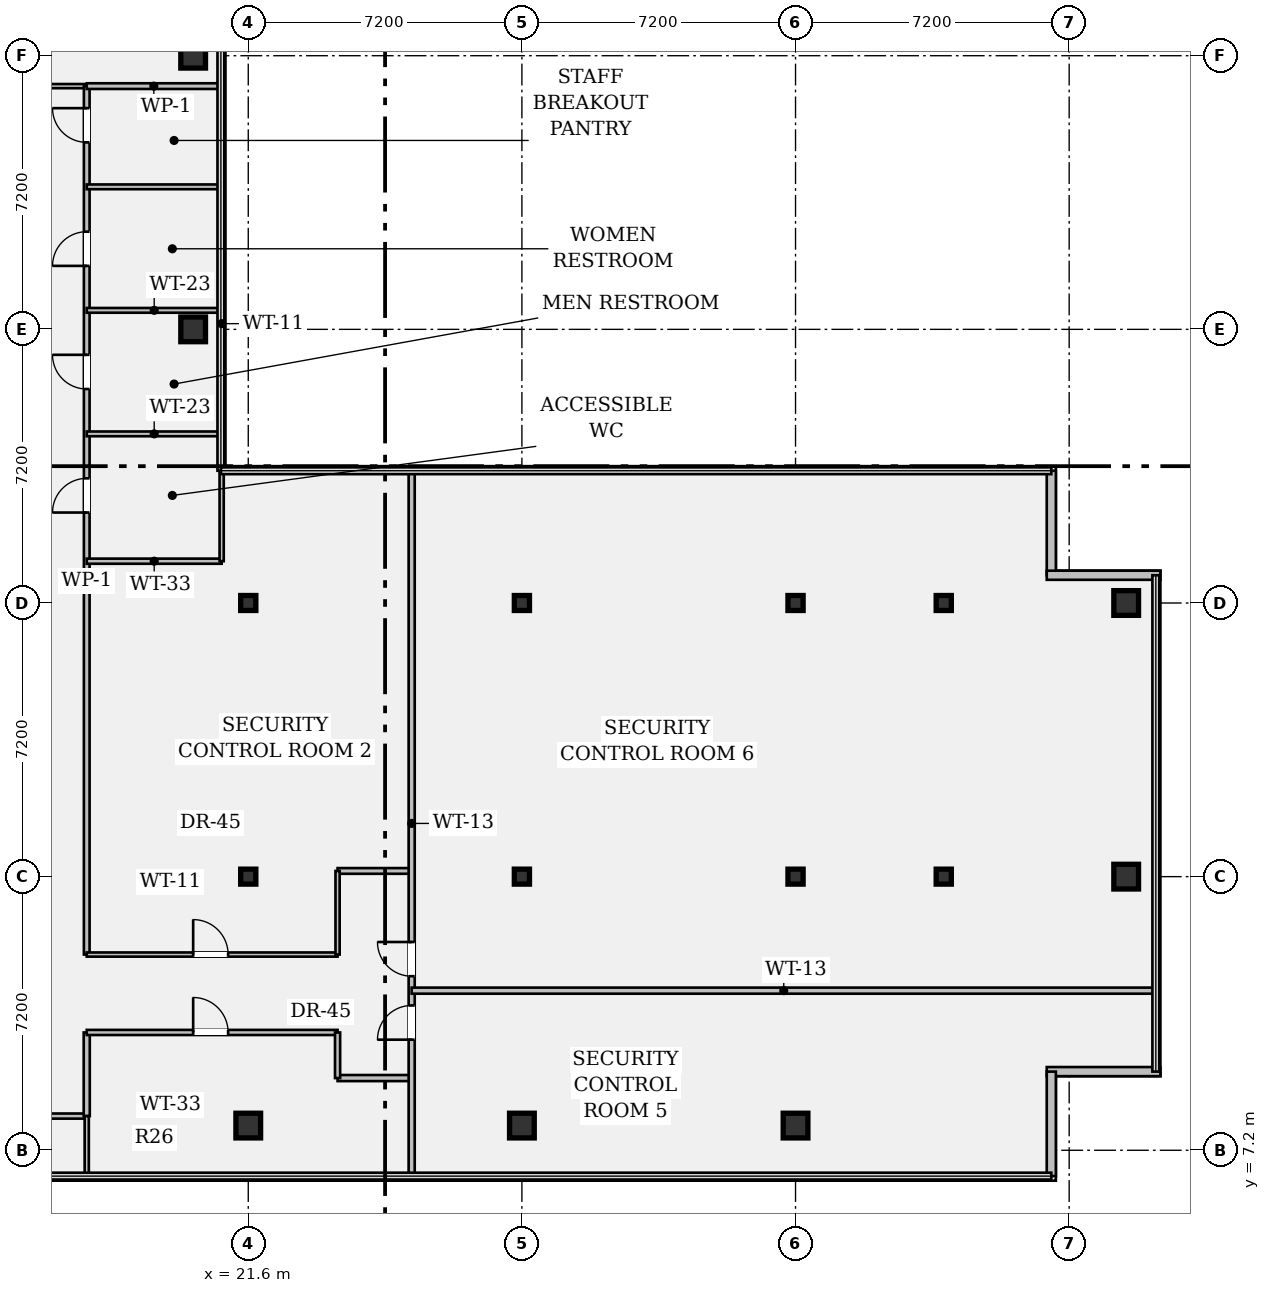
"""IFC4 building model, lengths in metres.
Left out: names, types, materials, properties, quantities, classifications, styles, units other than length and angle.
Written with IfcOpenShell. Run it as: python <this file> out.ifc"""

import sys

from ifc_helpers import new_model, si_unit, direction, frame, frame_2d, origin, origin_2d, place, context, subcontext, project, spatial, rectangle, hollow_rectangle, i_section, extrude, element, fill, save


model = new_model("IFC4")
c1 = context("Model", 3, precision=1e-05, world=origin(), true_north=direction((0.0, 1.0)))
c2 = subcontext(c1, "Body", "Model", "MODEL_VIEW")
j1 = project(units=[si_unit("LENGTHUNIT", "METRE"), si_unit("PLANEANGLEUNIT", "RADIAN")], contexts=[c1])
p1 = place(None, origin())
s1 = spatial("IfcSite", under=j1, at=p1, CompositionType="ELEMENT")
p2 = place(p1, origin())
s2 = spatial("IfcBuilding", under=s1, at=p2, CompositionType="ELEMENT")
p3 = place(p2, frame((0.0, 0.0, 244.65)))
s3 = spatial("IfcBuildingStorey", under=s2, at=p3, CompositionType="ELEMENT", Elevation=244.65)
for number, where, z_axis, x_axis in (
    (1, (20.15, 28.8, 0.0), (0.0, 0.0, 1.0), (1.0, 0.0, 0.0)),
    (2, (20.15, 36.0, 0.0), (0.0, 0.0, 1.0), (1.0, 0.0, 0.0)),
    (3, (21.6, 7.85, 0.0), (0.0, 0.0, 1.0), (1.0, 0.0, 0.0)),
):
    element("IfcColumn", number, at=place(p3, frame(where, z_axis=z_axis, x_axis=x_axis)), inside=s3, PredefinedType="COLUMN", context=c2, shape_type="SweptSolid", body=[
        extrude(hollow_rectangle(XDim=0.65, YDim=0.65, WallThickness=0.04, at=origin_2d()), origin(), (0.0, 0.0, 1.0), 3.24),
    ])
for number, where, z_axis, x_axis in (
    (4, (21.6, 14.4, 0.0), (0.0, 0.0, 1.0), (1.0, 0.0, 0.0)),
    (5, (21.6, 21.6, 0.0), (0.0, 0.0, 1.0), (1.0, 0.0, 0.0)),
):
    element("IfcColumn", number, at=place(p3, frame(where, z_axis=z_axis, x_axis=x_axis)), inside=s3, PredefinedType="COLUMN", context=c2, shape_type="SweptSolid", body=[
        extrude(i_section(OverallWidth=0.399, OverallDepth=0.394, WebThickness=0.023, FlangeThickness=0.037, FilletRadius=0.018, at=origin_2d()), origin(), (0.0, 0.0, 1.0), 3.24),
    ])
p4 = place(p3, frame((28.8, 7.85, 0.0), z_axis=(0.0, 0.0, 1.0), x_axis=(1.0, 0.0, 0.0)))
e6 = element("IfcColumn", 6, at=p4, inside=s3, PredefinedType="COLUMN", context=c2, shape_type="SweptSolid", body=[
    extrude(hollow_rectangle(XDim=0.65, YDim=0.65, WallThickness=0.04, at=origin_2d()), origin(), (0.0, 0.0, 1.0), 3.24),
])
for number, where, z_axis, x_axis in (
    (7, (28.8, 14.4, 0.0), (0.0, 0.0, 1.0), (1.0, 0.0, 0.0)),
    (8, (28.8, 21.6, 0.0), (0.0, 0.0, 1.0), (1.0, 0.0, 0.0)),
):
    element("IfcColumn", number, at=place(p3, frame(where, z_axis=z_axis, x_axis=x_axis)), inside=s3, PredefinedType="COLUMN", context=c2, shape_type="SweptSolid", body=[
        extrude(i_section(OverallWidth=0.399, OverallDepth=0.394, WebThickness=0.023, FlangeThickness=0.037, FilletRadius=0.018, at=origin_2d()), origin(), (0.0, 0.0, 1.0), 3.24),
    ])
p5 = place(p3, frame((36.0, 7.85, 0.0), z_axis=(0.0, 0.0, 1.0), x_axis=(1.0, 0.0, 0.0)))
e9 = element("IfcColumn", 9, at=p5, inside=s3, PredefinedType="COLUMN", context=c2, shape_type="SweptSolid", body=[
    extrude(hollow_rectangle(XDim=0.65, YDim=0.65, WallThickness=0.04, at=origin_2d()), origin(), (0.0, 0.0, 1.0), 3.24),
])
for number, where, z_axis, x_axis in (
    (10, (36.0, 14.4, 0.0), (0.0, 0.0, 1.0), (1.0, 0.0, 0.0)),
    (11, (36.0, 21.6, 0.0), (0.0, 0.0, 1.0), (1.0, 0.0, 0.0)),
    (12, (39.9, 14.4, 0.0), (0.0, 0.0, 1.0), (1.0, 0.0, 0.0)),
    (13, (39.9, 21.6, 0.0), (0.0, 0.0, 1.0), (1.0, 0.0, 0.0)),
):
    element("IfcColumn", number, at=place(p3, frame(where, z_axis=z_axis, x_axis=x_axis)), inside=s3, PredefinedType="COLUMN", context=c2, shape_type="SweptSolid", body=[
        extrude(i_section(OverallWidth=0.399, OverallDepth=0.394, WebThickness=0.023, FlangeThickness=0.037, FilletRadius=0.018, at=origin_2d()), origin(), (0.0, 0.0, 1.0), 3.24),
    ])
for number, where, z_axis, x_axis in (
    (14, (44.7, 14.4, 0.0), (0.0, 0.0, 1.0), (1.0, 0.0, 0.0)),
    (15, (44.7, 21.6, 0.0), (0.0, 0.0, 1.0), (1.0, 0.0, 0.0)),
):
    element("IfcColumn", number, at=place(p3, frame(where, z_axis=z_axis, x_axis=x_axis)), inside=s3, PredefinedType="COLUMN", context=c2, shape_type="SweptSolid", body=[
        extrude(hollow_rectangle(XDim=0.65, YDim=0.65, WallThickness=0.04, at=origin_2d()), origin(), (0.0, 0.0, 1.0), 3.24),
    ])
p6 = place(p3, frame((42.73, 25.08, 0.0), z_axis=(0.0, 0.0, 1.0), x_axis=(0.0, -1.0, 0.0)))
e16 = element("IfcWall", 16, at=p6, inside=s3, PredefinedType="STANDARD", context=c2, shape_type="SweptSolid", body=[
    extrude(rectangle(XDim=2.75, YDim=0.24, at=frame_2d((1.375, 0.0))), origin(), (0.0, 0.0, 1.0), 3.24),
])
for number, where, z_axis, x_axis in (
    (17, (42.61, 22.33, 0.0), (0.0, 0.0, 1.0), (1.0, 0.0, 0.0)),
    (18, (45.6, 9.27, 0.0), (0.0, 0.0, 1.0), (-1.0, 0.0, 0.0)),
):
    element("IfcWall", number, at=place(p3, frame(where, z_axis=z_axis, x_axis=x_axis)), inside=s3, PredefinedType="STANDARD", context=c2, shape_type="SweptSolid", body=[
        extrude(rectangle(XDim=2.99, YDim=0.24, at=frame_2d((1.495, 0.0))), origin(), (0.0, 0.0, 1.0), 3.24),
    ])
p7 = place(p3, frame((42.73, 9.27, 0.0), z_axis=(0.0, 0.0, 1.0), x_axis=(0.0, -1.0, 0.0)))
e19 = element("IfcWall", 19, at=p7, inside=s3, PredefinedType="STANDARD", context=c2, shape_type="SweptSolid", body=[
    extrude(rectangle(XDim=2.75, YDim=0.24, at=frame_2d((1.375, 0.0))), origin(), (0.0, 0.0, 1.0), 3.24),
])
p8 = place(p3, frame((14.4, 8.1, 0.0), z_axis=(0.0, 0.0, 1.0), x_axis=(1.0, 0.0, 0.0)))
e20 = element("IfcWall", 20, at=p8, inside=s3, PredefinedType="PARTITIONING", context=c2, shape_type="SweptSolid", body=[
    extrude(rectangle(XDim=2.95, YDim=0.135, at=frame_2d((1.475, 0.0))), origin(), (0.0, 0.0, 1.0), 3.24),
])
p9 = place(p8, frame((0.95, 0.0, 0.0)))
e21 = element("IfcOpeningElement", 21, at=p9, cuts=e20, PredefinedType="OPENING", context=c2, shape_type="SweptSolid", body=[
    extrude(rectangle(XDim=0.92, YDim=2.15, at=frame_2d((0.46, 1.075))), frame((0.0, 0.08, 0.0), z_axis=(0.0, -1.0, 0.0), x_axis=(1.0, 0.0, 0.0)), (0.0, 0.0, 1.0), 0.159),
])
p10 = place(p3, frame((14.4, 35.2, 0.0), z_axis=(0.0, 0.0, 1.0), x_axis=(1.0, 0.0, 0.0)))
e22 = element("IfcWall", 22, at=p10, inside=s3, PredefinedType="PARTITIONING", context=c2, shape_type="SweptSolid", body=[
    extrude(rectangle(XDim=2.95, YDim=0.11, at=frame_2d((1.475, 0.0))), origin(), (0.0, 0.0, 1.0), 2.808),
])
p11 = place(p10, frame((0.95, 0.0, 0.0)))
e23 = element("IfcOpeningElement", 23, at=p11, cuts=e22, PredefinedType="OPENING", context=c2, shape_type="SweptSolid", body=[
    extrude(rectangle(XDim=1.0, YDim=2.15, at=frame_2d((0.5, 1.075))), frame((0.0, 0.067, 0.0), z_axis=(0.0, -1.0, 0.0), x_axis=(1.0, 0.0, 0.0)), (0.0, 0.0, 1.0), 0.134),
])
p12 = place(p3, frame((17.35, 8.1, 0.0), z_axis=(0.0, 0.0, 1.0), x_axis=(0.0, 1.0, 0.0)))
e24 = element("IfcWall", 24, at=p12, inside=s3, PredefinedType="PARTITIONING", context=c2, shape_type="SweptSolid", body=[
    extrude(rectangle(XDim=2.2, YDim=0.16, at=frame_2d((1.1, 0.0))), origin(), (0.0, 0.0, 1.0), 3.24),
])
p13 = place(p3, frame((17.35, 12.35, 0.0), z_axis=(0.0, 0.0, 1.0), x_axis=(0.0, 1.0, 0.0)))
e25 = element("IfcWall", 25, at=p13, inside=s3, PredefinedType="PARTITIONING", context=c2, shape_type="SweptSolid", body=[
    extrude(rectangle(XDim=22.85, YDim=0.15, at=frame_2d((11.425, 0.0))), origin(), (0.0, 0.0, 1.0), 2.676),
])
p14 = place(p13, frame((11.63, 0.0, 0.0)))
e26 = element("IfcOpeningElement", 26, at=p14, cuts=e25, PredefinedType="OPENING", context=c2, shape_type="SweptSolid", body=[
    extrude(rectangle(XDim=0.9, YDim=2.15, at=frame_2d((0.45, 1.075))), frame((0.0, 0.087, 0.0), z_axis=(0.0, -1.0, 0.0), x_axis=(1.0, 0.0, 0.0)), (0.0, 0.0, 1.0), 0.174),
])
p15 = place(p13, frame((14.88, 0.0, 0.0)))
e27 = element("IfcOpeningElement", 27, at=p15, cuts=e25, PredefinedType="OPENING", context=c2, shape_type="SweptSolid", body=[
    extrude(rectangle(XDim=0.9, YDim=2.15, at=frame_2d((0.45, 1.075))), frame((0.0, 0.087, 0.0), z_axis=(0.0, -1.0, 0.0), x_axis=(1.0, 0.0, 0.0)), (0.0, 0.0, 1.0), 0.174),
])
p16 = place(p13, frame((18.12, 0.0, 0.0)))
e28 = element("IfcOpeningElement", 28, at=p16, cuts=e25, PredefinedType="OPENING", context=c2, shape_type="SweptSolid", body=[
    extrude(rectangle(XDim=0.9, YDim=2.15, at=frame_2d((0.45, 1.075))), frame((0.0, 0.087, 0.0), z_axis=(0.0, -1.0, 0.0), x_axis=(1.0, 0.0, 0.0)), (0.0, 0.0, 1.0), 0.174),
])
p17 = place(p13, frame((21.37, 0.0, 0.0)))
e29 = element("IfcOpeningElement", 29, at=p17, cuts=e25, PredefinedType="OPENING", context=c2, shape_type="SweptSolid", body=[
    extrude(rectangle(XDim=0.9, YDim=2.15, at=frame_2d((0.45, 1.075))), frame((0.0, 0.087, 0.0), z_axis=(0.0, -1.0, 0.0), x_axis=(1.0, 0.0, 0.0)), (0.0, 0.0, 1.0), 0.174),
])
p18 = place(p3, frame((17.35, 10.3, 0.0), z_axis=(0.0, 0.0, 1.0), x_axis=(1.0, 0.0, 0.0)))
e30 = element("IfcWall", 30, at=p18, inside=s3, PredefinedType="PARTITIONING", context=c2, shape_type="SweptSolid", body=[
    extrude(rectangle(XDim=6.6, YDim=0.135, at=frame_2d((3.3, 0.0))), origin(), (0.0, 0.0, 1.0), 2.676),
])
p19 = place(p18, frame((2.8, 0.0, 0.0)))
e31 = element("IfcOpeningElement", 31, at=p19, cuts=e30, PredefinedType="OPENING", context=c2, shape_type="SweptSolid", body=[
    extrude(rectangle(XDim=0.92, YDim=2.15, at=frame_2d((0.46, 1.075))), frame((0.0, 0.08, 0.0), z_axis=(0.0, -1.0, 0.0), x_axis=(1.0, 0.0, 0.0)), (0.0, 0.0, 1.0), 0.159),
])
p20 = place(p3, frame((17.35, 12.35, 0.0), z_axis=(0.0, 0.0, 1.0), x_axis=(1.0, 0.0, 0.0)))
e32 = element("IfcWall", 32, at=p20, inside=s3, PredefinedType="PARTITIONING", context=c2, shape_type="SweptSolid", body=[
    extrude(rectangle(XDim=6.6, YDim=0.11, at=frame_2d((3.3, 0.0))), origin(), (0.0, 0.0, 1.0), 2.676),
])
p21 = place(p20, frame((2.8, 0.0, 0.0)))
e33 = element("IfcOpeningElement", 33, at=p21, cuts=e32, PredefinedType="OPENING", context=c2, shape_type="SweptSolid", body=[
    extrude(rectangle(XDim=0.92, YDim=2.15, at=frame_2d((0.46, 1.075))), frame((0.0, 0.067, 0.0), z_axis=(0.0, -1.0, 0.0), x_axis=(1.0, 0.0, 0.0)), (0.0, 0.0, 1.0), 0.134),
])
p22 = place(p3, frame((23.95, 9.1, 0.0), z_axis=(0.0, 0.0, 1.0), x_axis=(1.0, 0.0, 0.0)))
e34 = element("IfcWall", 34, at=p22, inside=s3, PredefinedType="PARTITIONING", context=c2, shape_type="SweptSolid", body=[
    extrude(rectangle(XDim=1.95, YDim=0.16, at=frame_2d((0.975, 0.0))), origin(), (0.0, 0.0, 1.0), 2.808),
])
p23 = place(p3, frame((23.95, 14.55, 0.0), z_axis=(0.0, 0.0, 1.0), x_axis=(1.0, 0.0, 0.0)))
e35 = element("IfcWall", 35, at=p23, inside=s3, PredefinedType="PARTITIONING", context=c2, shape_type="SweptSolid", body=[
    extrude(rectangle(XDim=1.95, YDim=0.15, at=frame_2d((0.975, 0.0))), origin(), (0.0, 0.0, 1.0), 2.676),
])
p24 = place(p3, frame((23.95, 9.1, 0.0), z_axis=(0.0, 0.0, 1.0), x_axis=(0.0, 1.0, 0.0)))
e36 = element("IfcWall", 36, at=p24, inside=s3, PredefinedType="PARTITIONING", context=c2, shape_type="SweptSolid", body=[
    extrude(rectangle(XDim=1.2, YDim=0.135, at=frame_2d((0.6, 0.0))), origin(), (0.0, 0.0, 1.0), 2.808),
])
p25 = place(p3, frame((23.95, 12.35, 0.0), z_axis=(0.0, 0.0, 1.0), x_axis=(0.0, 1.0, 0.0)))
e37 = element("IfcWall", 37, at=p25, inside=s3, PredefinedType="PARTITIONING", context=c2, shape_type="SweptSolid", body=[
    extrude(rectangle(XDim=2.2, YDim=0.11, at=frame_2d((1.1, 0.0))), origin(), (0.0, 0.0, 1.0), 2.676),
])
p26 = place(p3, frame((25.9, 6.52, 0.0), z_axis=(0.0, 0.0, 1.0), x_axis=(0.0, 1.0, 0.0)))
e38 = element("IfcWall", 38, at=p26, inside=s3, PredefinedType="PARTITIONING", context=c2, shape_type="SweptSolid", body=[
    extrude(rectangle(XDim=18.56, YDim=0.16, at=frame_2d((9.28, 0.0))), origin(), (0.0, 0.0, 1.0), 2.676),
])
p27 = place(p26, frame((3.59, 0.0, 0.0)))
e39 = element("IfcOpeningElement", 39, at=p27, cuts=e38, PredefinedType="OPENING", context=c2, shape_type="SweptSolid", body=[
    extrude(rectangle(XDim=0.9, YDim=2.15, at=frame_2d((0.45, 1.075))), frame((0.0, 0.092, 0.0), z_axis=(0.0, -1.0, 0.0), x_axis=(1.0, 0.0, 0.0)), (0.0, 0.0, 1.0), 0.184),
])
p28 = place(p26, frame((5.26, 0.0, 0.0)))
e40 = element("IfcOpeningElement", 40, at=p28, cuts=e38, PredefinedType="OPENING", context=c2, shape_type="SweptSolid", body=[
    extrude(rectangle(XDim=0.9, YDim=2.15, at=frame_2d((0.45, 1.075))), frame((0.0, 0.092, 0.0), z_axis=(0.0, -1.0, 0.0), x_axis=(1.0, 0.0, 0.0)), (0.0, 0.0, 1.0), 0.184),
])
p29 = place(p3, frame((17.35, 35.2, 0.0), z_axis=(0.0, 0.0, 1.0), x_axis=(1.0, 0.0, 0.0)))
e41 = element("IfcWall", 41, at=p29, inside=s3, PredefinedType="PARTITIONING", context=c2, shape_type="SweptSolid", body=[
    extrude(rectangle(XDim=3.53, YDim=0.15, at=frame_2d((1.765, 0.0))), origin(), (0.0, 0.0, 1.0), 2.808),
])
p30 = place(p3, frame((17.35, 22.7, 0.0), z_axis=(0.0, 0.0, 1.0), x_axis=(1.0, 0.0, 0.0)))
e42 = element("IfcWall", 42, at=p30, inside=s3, PredefinedType="PARTITIONING", context=c2, shape_type="SweptSolid", body=[
    extrude(rectangle(XDim=3.55, YDim=0.135, at=frame_2d((1.775, 0.0))), origin(), (0.0, 0.0, 1.0), 2.808),
])
p31 = place(p3, frame((20.9, 22.7, 0.0), z_axis=(0.0, 0.0, 1.0), x_axis=(0.0, 1.0, 0.0)))
e43 = element("IfcWall", 43, at=p31, inside=s3, PredefinedType="PARTITIONING", context=c2, shape_type="SweptSolid", body=[
    extrude(rectangle(XDim=12.5, YDim=0.11, at=frame_2d((6.25, 0.0))), origin(), (0.0, 0.0, 1.0), 3.24),
])
for number, where, z_axis, x_axis in (
    (44, (17.35, 26.05, 0.0), (0.0, 0.0, 1.0), (1.0, 0.0, 0.0)),
    (45, (17.35, 29.3, 0.0), (0.0, 0.0, 1.0), (1.0, 0.0, 0.0)),
    (46, (17.35, 32.55, 0.0), (0.0, 0.0, 1.0), (1.0, 0.0, 0.0)),
):
    element("IfcWall", number, at=place(p3, frame(where, z_axis=z_axis, x_axis=x_axis)), inside=s3, PredefinedType="PARTITIONING", context=c2, shape_type="SweptSolid", body=[
        extrude(rectangle(XDim=3.55, YDim=0.125, at=frame_2d((1.775, 0.0))), origin(), (0.0, 0.0, 1.0), 2.808),
    ])
p32 = place(p3, frame((17.35, 6.52, 0.0), z_axis=(0.0, 0.0, 1.0), x_axis=(0.0, 1.0, 0.0)))
e47 = element("IfcWall", 47, at=p32, inside=s3, PredefinedType="PARTITIONING", context=c2, shape_type="SweptSolid", body=[
    extrude(rectangle(XDim=1.58, YDim=0.11, at=frame_2d((0.79, 0.0))), origin(), (0.0, 0.0, 1.0), 3.24),
])
p33 = place(p3, frame((25.9, 11.4, 0.0), z_axis=(0.0, 0.0, 1.0), x_axis=(1.0, 0.0, 0.0)))
e48 = element("IfcWall", 48, at=p33, inside=s3, PredefinedType="PARTITIONING", context=c2, shape_type="SweptSolid", body=[
    extrude(rectangle(XDim=19.58, YDim=0.16, at=frame_2d((9.79, 0.0))), origin(), (0.0, 0.0, 1.0), 2.676),
])
p34 = place(p14, origin())
e49 = element("IfcDoor", 49, at=p34, inside=s3, OperationType="SINGLE_SWING_LEFT", PredefinedType="DOOR", context=c2, shape_type="SweptSolid", body=[
    extrude(rectangle(XDim=0.9, YDim=2.15, at=frame_2d((0.45, 1.075))), frame((0.0, 0.025, 0.0), z_axis=(0.0, -1.0, 0.0), x_axis=(1.0, 0.0, 0.0)), (0.0, 0.0, 1.0), 0.05),
])
fill(e26, e49)
p35 = place(p15, origin())
e50 = element("IfcDoor", 50, at=p35, inside=s3, OperationType="SINGLE_SWING_RIGHT", PredefinedType="DOOR", context=c2, shape_type="SweptSolid", body=[
    extrude(rectangle(XDim=0.9, YDim=2.15, at=frame_2d((0.45, 1.075))), frame((0.0, 0.025, 0.0), z_axis=(0.0, -1.0, 0.0), x_axis=(1.0, 0.0, 0.0)), (0.0, 0.0, 1.0), 0.05),
])
fill(e27, e50)
p36 = place(p16, origin())
e51 = element("IfcDoor", 51, at=p36, inside=s3, OperationType="SINGLE_SWING_LEFT", PredefinedType="DOOR", context=c2, shape_type="SweptSolid", body=[
    extrude(rectangle(XDim=0.9, YDim=2.15, at=frame_2d((0.45, 1.075))), frame((0.0, 0.025, 0.0), z_axis=(0.0, -1.0, 0.0), x_axis=(1.0, 0.0, 0.0)), (0.0, 0.0, 1.0), 0.05),
])
fill(e28, e51)
p37 = place(p17, origin())
e52 = element("IfcDoor", 52, at=p37, inside=s3, OperationType="SINGLE_SWING_RIGHT", PredefinedType="DOOR", context=c2, shape_type="SweptSolid", body=[
    extrude(rectangle(XDim=0.9, YDim=2.15, at=frame_2d((0.45, 1.075))), frame((0.0, 0.025, 0.0), z_axis=(0.0, -1.0, 0.0), x_axis=(1.0, 0.0, 0.0)), (0.0, 0.0, 1.0), 0.05),
])
fill(e29, e52)
p38 = place(p21, origin())
e53 = element("IfcDoor", 53, at=p38, inside=s3, OperationType="SINGLE_SWING_LEFT", PredefinedType="DOOR", context=c2, shape_type="SweptSolid", body=[
    extrude(rectangle(XDim=0.92, YDim=2.15, at=frame_2d((0.46, 1.075))), frame((0.0, 0.025, 0.0), z_axis=(0.0, -1.0, 0.0), x_axis=(1.0, 0.0, 0.0)), (0.0, 0.0, 1.0), 0.05),
])
fill(e33, e53)
p39 = place(p19, origin())
e54 = element("IfcDoor", 54, at=p39, inside=s3, OperationType="SINGLE_SWING_LEFT", PredefinedType="DOOR", context=c2, shape_type="SweptSolid", body=[
    extrude(rectangle(XDim=0.92, YDim=2.15, at=frame_2d((0.46, 1.075))), frame((0.0, 0.025, 0.0), z_axis=(0.0, -1.0, 0.0), x_axis=(1.0, 0.0, 0.0)), (0.0, 0.0, 1.0), 0.05),
])
fill(e31, e54)
p40 = place(p27, origin())
e55 = element("IfcDoor", 55, at=p40, inside=s3, OperationType="SINGLE_SWING_LEFT", PredefinedType="DOOR", context=c2, shape_type="SweptSolid", body=[
    extrude(rectangle(XDim=0.9, YDim=2.15, at=frame_2d((0.45, 1.075))), frame((0.0, 0.025, 0.0), z_axis=(0.0, -1.0, 0.0), x_axis=(1.0, 0.0, 0.0)), (0.0, 0.0, 1.0), 0.05),
])
fill(e39, e55)
p41 = place(p28, origin())
e56 = element("IfcDoor", 56, at=p41, inside=s3, OperationType="SINGLE_SWING_RIGHT", PredefinedType="DOOR", context=c2, shape_type="SweptSolid", body=[
    extrude(rectangle(XDim=0.9, YDim=2.15, at=frame_2d((0.45, 1.075))), frame((0.0, 0.025, 0.0), z_axis=(0.0, -1.0, 0.0), x_axis=(1.0, 0.0, 0.0)), (0.0, 0.0, 1.0), 0.05),
])
fill(e40, e56)
save(model, sys.argv[1])
